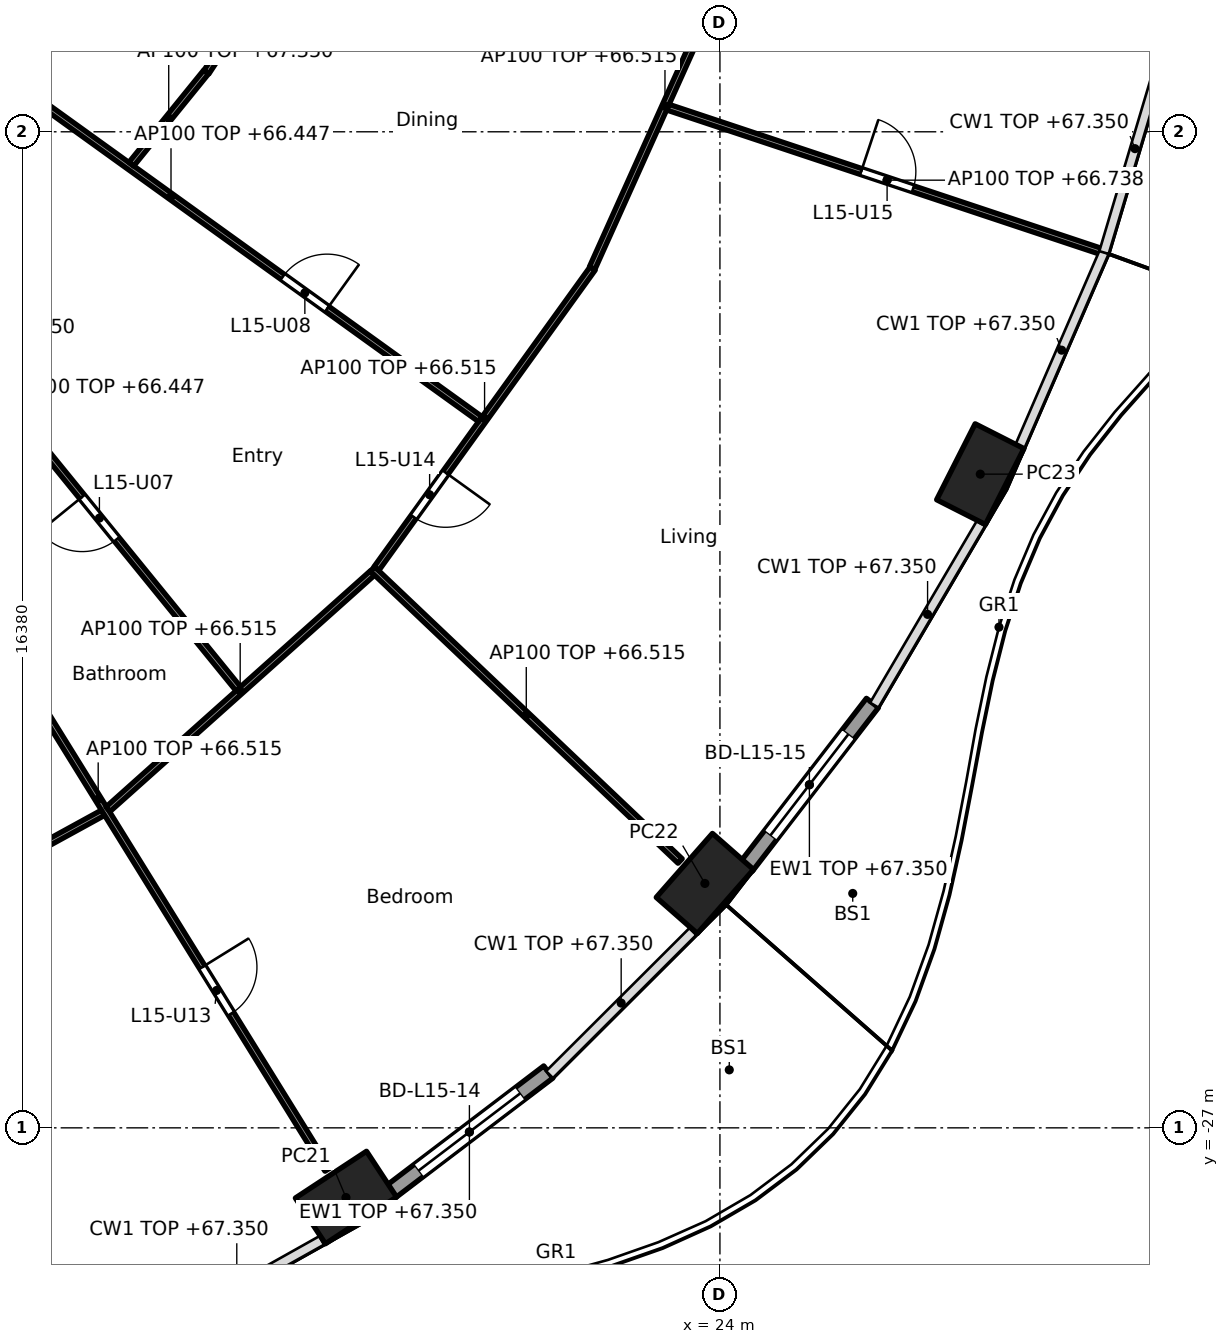
"""IFC4 building model, lengths in metres.
Left out: names, types, materials, properties, quantities, classifications, styles, units other than length and angle.
Written with IfcOpenShell. Run it as: python <this file> out.ifc"""

import sys

from ifc_helpers import new_model, si_unit, direction, frame, frame_2d, origin, origin_2d, place, context, subcontext, project, spatial, rectangle, hollow_rectangle, extrude, element, fill, save


model = new_model("IFC4")
c1 = context("Model", 3, precision=1e-05, world=origin(), true_north=direction((0.0, 1.0)))
c2 = subcontext(c1, "Body", "Model", "MODEL_VIEW")
j1 = project(units=[si_unit("LENGTHUNIT", "METRE"), si_unit("PLANEANGLEUNIT", "RADIAN")], contexts=[c1])
p1 = place(None, origin())
s1 = spatial("IfcSite", under=j1, at=p1, CompositionType="ELEMENT")
p2 = place(p1, origin())
s2 = spatial("IfcBuilding", under=s1, at=p2, CompositionType="ELEMENT")
p3 = place(p2, frame((0.0, 0.0, 64.0)))
s3 = spatial("IfcBuildingStorey", under=s2, at=p3, CompositionType="ELEMENT", Elevation=64.0)
for number, where, z_axis, x_axis in (
    (1, (17.85, -28.146, 0.0), (0.0, 0.0, 1.0), (0.836, 0.549, 0.0)),
    (2, (23.752, -22.981, 0.0), (0.0, 0.0, 1.0), (0.66, 0.751, 0.0)),
    (3, (28.282, -16.25, 0.0), (0.0, 0.0, 1.0), (0.452, 0.892, 0.0)),
):
    element("IfcColumn", number, at=place(p3, frame(where, z_axis=z_axis, x_axis=x_axis)), inside=s3, PredefinedType="COLUMN", context=c2, shape_type="SweptSolid", body=[
        extrude(hollow_rectangle(XDim=1.4, YDim=0.9, WallThickness=0.05, at=origin_2d()), origin(), (0.0, 0.0, 1.0), 3.7),
    ])
p4 = place(p3, frame((21.178, -26.081, 0.0), z_axis=(0.0, 0.0, 1.0), x_axis=(-0.796022293214, -0.605267303517, 0.0)))
e4 = element("IfcWall", 4, at=p4, inside=s3, PredefinedType="SOLIDWALL", context=c2, shape_type="SweptSolid", body=[
    extrude(rectangle(XDim=3.262, YDim=0.25, at=frame_2d((1.631, 0.0))), origin(), (0.0, 0.0, 1.0), 3.35),
])
p5 = place(p4, frame((0.581, 0.0, 0.0)))
e5 = element("IfcOpeningElement", 5, at=p5, cuts=e4, PredefinedType="OPENING", context=c2, shape_type="SweptSolid", body=[
    extrude(rectangle(XDim=2.1, YDim=2.4, at=frame_2d((1.05, 1.2))), frame((0.0, 0.135, 0.0), z_axis=(0.0, -1.0, 0.0), x_axis=(1.0, 0.0, 0.0)), (0.0, 0.0, 1.0), 0.27),
])
p6 = place(p3, frame((26.508, -20.013, 0.0), z_axis=(0.0, 0.0, 1.0), x_axis=(-0.610457147657, -0.792049285635, 0.0)))
e6 = element("IfcWall", 6, at=p6, inside=s3, PredefinedType="SOLIDWALL", context=c2, shape_type="SweptSolid", body=[
    extrude(rectangle(XDim=3.397, YDim=0.25, at=frame_2d((1.699, 0.0))), origin(), (0.0, 0.0, 1.0), 3.35),
])
p7 = place(p6, frame((0.649, 0.0, 0.0)))
e7 = element("IfcOpeningElement", 7, at=p7, cuts=e6, PredefinedType="OPENING", context=c2, shape_type="SweptSolid", body=[
    extrude(rectangle(XDim=2.1, YDim=2.4, at=frame_2d((1.05, 1.2))), frame((0.0, 0.135, 0.0), z_axis=(0.0, -1.0, 0.0), x_axis=(1.0, 0.0, 0.0)), (0.0, 0.0, 1.0), 0.27),
])
p8 = place(p3, frame((9.001, -24.48, 0.0), z_axis=(0.0, 0.0, 1.0), x_axis=(0.876794415294, 0.480865421203, 0.0)))
e8 = element("IfcWall", 8, at=p8, inside=s3, PredefinedType="PARTITIONING", context=c2, shape_type="SweptSolid", body=[
    extrude(rectangle(XDim=5.536, YDim=0.1, at=frame_2d((2.768, 0.0))), origin(), (0.0, 0.0, 1.0), 2.515),
])
p9 = place(p8, frame((2.318, 0.0, 0.0)))
e9 = element("IfcOpeningElement", 9, at=p9, cuts=e8, PredefinedType="OPENING", context=c2, shape_type="SweptSolid", body=[
    extrude(rectangle(XDim=0.9, YDim=2.1, at=frame_2d((0.45, 1.05))), frame((0.0, 0.06, 0.0), z_axis=(0.0, -1.0, 0.0), x_axis=(1.0, 0.0, 0.0)), (0.0, 0.0, 1.0), 0.12),
])
p10 = place(p3, frame((10.003, -15.503, 0.0), z_axis=(0.0, 0.0, 1.0), x_axis=(0.526446106164, -0.850208502254, 0.0)))
e10 = element("IfcWall", 10, at=p10, inside=s3, PredefinedType="PARTITIONING", context=c2, shape_type="SweptSolid", body=[
    extrude(rectangle(XDim=14.33, YDim=0.1, at=frame_2d((7.165, 0.0))), origin(), (0.0, 0.0, 1.0), 2.515),
])
p11 = place(p10, frame((10.415, 0.0, 0.0)))
e11 = element("IfcOpeningElement", 11, at=p11, cuts=e10, PredefinedType="OPENING", context=c2, shape_type="SweptSolid", body=[
    extrude(rectangle(XDim=0.9, YDim=2.1, at=frame_2d((0.45, 1.05))), frame((0.0, 0.06, 0.0), z_axis=(0.0, -1.0, 0.0), x_axis=(1.0, 0.0, 0.0)), (0.0, 0.0, 1.0), 0.12),
])
p12 = place(p3, frame((13.936, -21.761, 0.0), z_axis=(0.0, 0.0, 1.0), x_axis=(0.745806142791, 0.666163041136, 0.0)))
e12 = element("IfcWall", 12, at=p12, inside=s3, PredefinedType="PARTITIONING", context=c2, shape_type="SweptSolid", body=[
    extrude(rectangle(XDim=5.831, YDim=0.1, at=frame_2d((2.915, 0.0))), origin(), (0.0, 0.0, 1.0), 2.515),
])
p13 = place(p3, frame((8.028, -9.882, 0.0), z_axis=(0.0, 0.0, 1.0), x_axis=(0.631035554955, -0.77575390968, 0.0)))
e13 = element("IfcWall", 13, at=p13, inside=s3, PredefinedType="PARTITIONING", context=c2, shape_type="SweptSolid", body=[
    extrude(rectangle(XDim=12.759, YDim=0.1, at=frame_2d((6.379, 0.0))), origin(), (0.0, 0.0, 1.0), 2.447),
])
p14 = place(p13, frame((2.311, 0.0, 0.0)))
e14 = element("IfcOpeningElement", 14, at=p14, cuts=e13, PredefinedType="OPENING", context=c2, shape_type="SweptSolid", body=[
    extrude(rectangle(XDim=0.9, YDim=2.1, at=frame_2d((0.45, 1.05))), frame((0.0, 0.06, 0.0), z_axis=(0.0, -1.0, 0.0), x_axis=(1.0, 0.0, 0.0)), (0.0, 0.0, 1.0), 0.12),
])
p15 = place(p13, frame((8.69, 0.0, 0.0)))
e15 = element("IfcOpeningElement", 15, at=p15, cuts=e13, PredefinedType="OPENING", context=c2, shape_type="SweptSolid", body=[
    extrude(rectangle(XDim=0.9, YDim=2.1, at=frame_2d((0.45, 1.05))), frame((0.0, 0.06, 0.0), z_axis=(0.0, -1.0, 0.0), x_axis=(1.0, 0.0, 0.0)), (0.0, 0.0, 1.0), 0.12),
])
p16 = place(p3, frame((18.286, -17.809, 0.0), z_axis=(0.0, 0.0, 1.0), x_axis=(0.725242309581, -0.688493712676, 0.0)))
e16 = element("IfcWall", 16, at=p16, inside=s3, PredefinedType="PARTITIONING", context=c2, shape_type="SweptSolid", body=[
    extrude(rectangle(XDim=6.976, YDim=0.1, at=frame_2d((3.488, 0.0))), origin(), (0.0, 0.0, 1.0), 2.515),
])
p17 = place(p3, frame((18.351, -17.803, 0.0), z_axis=(0.0, 0.0, 1.0), x_axis=(0.584558392935, 0.811351640936, 0.0)))
e17 = element("IfcWall", 17, at=p17, inside=s3, PredefinedType="PARTITIONING", context=c2, shape_type="SweptSolid", body=[
    extrude(rectangle(XDim=6.084, YDim=0.1, at=frame_2d((3.042, 0.0))), origin(), (0.0, 0.0, 1.0), 2.515),
])
p18 = place(p17, frame((1.046, 0.0, 0.0)))
e18 = element("IfcOpeningElement", 18, at=p18, cuts=e17, PredefinedType="OPENING", context=c2, shape_type="SweptSolid", body=[
    extrude(rectangle(XDim=0.9, YDim=2.1, at=frame_2d((0.45, 1.05))), frame((0.0, 0.06, 0.0), z_axis=(0.0, -1.0, 0.0), x_axis=(1.0, 0.0, 0.0)), (0.0, 0.0, 1.0), 0.12),
])
p19 = place(p3, frame((9.886, -8.023, 0.0), z_axis=(0.0, 0.0, 1.0), x_axis=(0.811615973871, -0.58419133078, 0.0)))
e19 = element("IfcWall", 19, at=p19, inside=s3, PredefinedType="PARTITIONING", context=c2, shape_type="SweptSolid", body=[
    extrude(rectangle(XDim=12.535, YDim=0.1, at=frame_2d((6.268, 0.0))), origin(), (0.0, 0.0, 1.0), 2.447),
])
p20 = place(p19, frame((2.262, 0.0, 0.0)))
e20 = element("IfcOpeningElement", 20, at=p20, cuts=e19, PredefinedType="OPENING", context=c2, shape_type="SweptSolid", body=[
    extrude(rectangle(XDim=0.9, YDim=2.1, at=frame_2d((0.45, 1.05))), frame((0.0, 0.06, 0.0), z_axis=(0.0, -1.0, 0.0), x_axis=(1.0, 0.0, 0.0)), (0.0, 0.0, 1.0), 0.12),
])
p21 = place(p19, frame((8.53, 0.0, 0.0)))
e21 = element("IfcOpeningElement", 21, at=p21, cuts=e19, PredefinedType="OPENING", context=c2, shape_type="SweptSolid", body=[
    extrude(rectangle(XDim=0.9, YDim=2.1, at=frame_2d((0.45, 1.05))), frame((0.0, 0.06, 0.0), z_axis=(0.0, -1.0, 0.0), x_axis=(1.0, 0.0, 0.0)), (0.0, 0.0, 1.0), 0.12),
])
p22 = place(p3, frame((14.32, -11.153, 0.0), z_axis=(0.0, 0.0, 1.0), x_axis=(0.63006076661, 0.776545832761, 0.0)))
e22 = element("IfcWall", 22, at=p22, inside=s3, PredefinedType="PARTITIONING", context=c2, shape_type="SweptSolid", body=[
    extrude(rectangle(XDim=1.953, YDim=0.1, at=frame_2d((0.977, 0.0))), origin(), (0.0, 0.0, 1.0), 3.35),
])
p23 = place(p3, frame((15.555, -9.639, 0.0), z_axis=(0.0, 0.0, 1.0), x_axis=(0.547618530423, 0.836728119007, 0.0)))
e23 = element("IfcWall", 23, at=p23, inside=s3, PredefinedType="PARTITIONING", context=c2, shape_type="SweptSolid", body=[
    extrude(rectangle(XDim=3.67, YDim=0.1, at=frame_2d((1.835, 0.0))), origin(), (0.0, 0.0, 1.0), 2.515),
])
p24 = place(p3, frame((21.899, -12.861, 0.0), z_axis=(0.0, 0.0, 1.0), x_axis=(0.410197710154, 0.911996622025, 0.0)))
e24 = element("IfcWall", 24, at=p24, inside=s3, PredefinedType="PARTITIONING", context=c2, shape_type="SweptSolid", body=[
    extrude(rectangle(XDim=5.837, YDim=0.1, at=frame_2d((2.918, 0.0))), origin(), (0.0, 0.0, 1.0), 2.515),
])
p25 = place(p3, frame((23.144, -10.216, 0.0), z_axis=(0.0, 0.0, 1.0), x_axis=(0.948811715359, -0.315842253027, 0.0)))
e25 = element("IfcWall", 25, at=p25, inside=s3, PredefinedType="PARTITIONING", context=c2, shape_type="SweptSolid", body=[
    extrude(rectangle(XDim=7.6, YDim=0.1, at=frame_2d((3.8, 0.0))), origin(), (0.0, 0.0, 1.0), 2.738),
])
p26 = place(p25, frame((3.35, 0.0, 0.0)))
e26 = element("IfcOpeningElement", 26, at=p26, cuts=e25, PredefinedType="OPENING", context=c2, shape_type="SweptSolid", body=[
    extrude(rectangle(XDim=0.9, YDim=2.1, at=frame_2d((0.45, 1.05))), frame((0.0, 0.06, 0.0), z_axis=(0.0, -1.0, 0.0), x_axis=(1.0, 0.0, 0.0)), (0.0, 0.0, 1.0), 0.12),
])
p27 = place(p5, origin())
e27 = element("IfcDoor", 27, at=p27, inside=s3, OperationType="SLIDING_TO_LEFT", PredefinedType="DOOR", context=c2, shape_type="SweptSolid", body=[
    extrude(rectangle(XDim=2.1, YDim=2.4, at=frame_2d((1.05, 1.2))), frame((0.0, 0.025, 0.0), z_axis=(0.0, -1.0, 0.0), x_axis=(1.0, 0.0, 0.0)), (0.0, 0.0, 1.0), 0.05),
])
fill(e5, e27)
p28 = place(p7, origin())
e28 = element("IfcDoor", 28, at=p28, inside=s3, OperationType="SLIDING_TO_LEFT", PredefinedType="DOOR", context=c2, shape_type="SweptSolid", body=[
    extrude(rectangle(XDim=2.1, YDim=2.4, at=frame_2d((1.05, 1.2))), frame((0.0, 0.025, 0.0), z_axis=(0.0, -1.0, 0.0), x_axis=(1.0, 0.0, 0.0)), (0.0, 0.0, 1.0), 0.05),
])
fill(e7, e28)
p29 = place(p15, frame((0.9, 0.0, 0.0), x_axis=(-1.0, 0.0, 0.0)))
e29 = element("IfcDoor", 29, at=p29, inside=s3, OperationType="SINGLE_SWING_RIGHT", PredefinedType="DOOR", context=c2, shape_type="SweptSolid", body=[
    extrude(rectangle(XDim=0.9, YDim=2.1, at=frame_2d((0.45, 1.05))), frame((0.0, 0.025, 0.0), z_axis=(0.0, -1.0, 0.0), x_axis=(1.0, 0.0, 0.0)), (0.0, 0.0, 1.0), 0.05),
])
fill(e15, e29)
p30 = place(p21, origin())
e30 = element("IfcDoor", 30, at=p30, inside=s3, OperationType="SINGLE_SWING_RIGHT", PredefinedType="DOOR", context=c2, shape_type="SweptSolid", body=[
    extrude(rectangle(XDim=0.9, YDim=2.1, at=frame_2d((0.45, 1.05))), frame((0.0, 0.025, 0.0), z_axis=(0.0, -1.0, 0.0), x_axis=(1.0, 0.0, 0.0)), (0.0, 0.0, 1.0), 0.05),
])
fill(e21, e30)
p31 = place(p11, origin())
e31 = element("IfcDoor", 31, at=p31, inside=s3, OperationType="SINGLE_SWING_LEFT", PredefinedType="DOOR", context=c2, shape_type="SweptSolid", body=[
    extrude(rectangle(XDim=0.9, YDim=2.1, at=frame_2d((0.45, 1.05))), frame((0.0, 0.025, 0.0), z_axis=(0.0, -1.0, 0.0), x_axis=(1.0, 0.0, 0.0)), (0.0, 0.0, 1.0), 0.05),
])
fill(e11, e31)
p32 = place(p18, frame((0.9, 0.0, 0.0), x_axis=(-1.0, 0.0, 0.0)))
e32 = element("IfcDoor", 32, at=p32, inside=s3, OperationType="SINGLE_SWING_LEFT", PredefinedType="DOOR", context=c2, shape_type="SweptSolid", body=[
    extrude(rectangle(XDim=0.9, YDim=2.1, at=frame_2d((0.45, 1.05))), frame((0.0, 0.025, 0.0), z_axis=(0.0, -1.0, 0.0), x_axis=(1.0, 0.0, 0.0)), (0.0, 0.0, 1.0), 0.05),
])
fill(e18, e32)
p33 = place(p26, origin())
e33 = element("IfcDoor", 33, at=p33, inside=s3, OperationType="SINGLE_SWING_LEFT", PredefinedType="DOOR", context=c2, shape_type="SweptSolid", body=[
    extrude(rectangle(XDim=0.9, YDim=2.1, at=frame_2d((0.45, 1.05))), frame((0.0, 0.025, 0.0), z_axis=(0.0, -1.0, 0.0), x_axis=(1.0, 0.0, 0.0)), (0.0, 0.0, 1.0), 0.05),
])
fill(e26, e33)
save(model, sys.argv[1])
